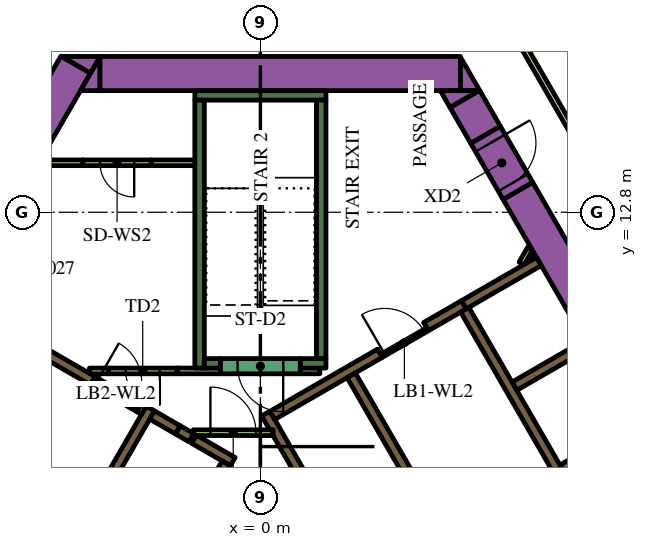
"""IFC4 building model, lengths in metres.
Left out: names, types, materials, properties, quantities, classifications, styles, units other than length and angle.
Written with IfcOpenShell. Run it as: python <this file> out.ifc"""

import sys

from ifc_helpers import new_model, si_unit, direction, frame, frame_2d, origin, place, context, subcontext, project, spatial, polyline, rectangle, outline, extrude, element, fill, save


model = new_model("IFC4")
c1 = context("Model", 3, precision=1e-05, world=origin(), true_north=direction((0.0, 1.0)))
c2 = subcontext(c1, "Body", "Model", "MODEL_VIEW")
j1 = project(units=[si_unit("LENGTHUNIT", "METRE"), si_unit("PLANEANGLEUNIT", "RADIAN")], contexts=[c1])
p1 = place(None, origin())
s1 = spatial("IfcSite", under=j1, at=p1, CompositionType="ELEMENT")
p2 = place(p1, origin())
s2 = spatial("IfcBuilding", under=s1, at=p2, CompositionType="ELEMENT")
p3 = place(p2, frame((0.0, 0.0, 126.6)))
s3 = spatial("IfcBuildingStorey", under=s2, at=p3, CompositionType="ELEMENT", Elevation=126.6)
p4 = place(p3, frame((6.776, 13.364, 0.0), z_axis=(0.0, 0.0, 1.0), x_axis=(0.500004177138, -0.8660229921, 0.0)))
e1 = element("IfcWall", 1, at=p4, inside=s3, PredefinedType="SOLIDWALL", context=c2, shape_type="SweptSolid", body=[
    extrude(rectangle(XDim=20.204, YDim=0.9, at=frame_2d((10.102, 0.0))), origin(), (0.0, 0.0, 1.0), 3.9),
])
p5 = place(p3, frame((-14.268, 0.387, 0.0), z_axis=(0.0, 0.0, 1.0), x_axis=(0.499994617707, 0.866028511231, 0.0)))
e2 = element("IfcWall", 2, at=p5, inside=s3, PredefinedType="SOLIDWALL", context=c2, shape_type="SweptSolid", body=[
    extrude(rectangle(XDim=18.817, YDim=0.9, at=frame_2d((9.409, 0.0))), origin(), (0.0, 0.0, 1.0), 3.9),
])
p6 = place(p3, origin())
e3 = element("IfcWall", 3, at=p6, inside=s3, PredefinedType="SOLIDWALL", context=c2, shape_type="SweptSolid", body=[
    extrude(outline(polyline([(-4.215, 16.9), (-4.469, 16.46), (-5.231, 16.9), (-4.215, 16.9)])), origin(), (0.0, 0.0, 1.0), 3.9),
])
p7 = place(p3, frame((-4.224, 16.45, 0.0), z_axis=(0.0, 0.0, 1.0), x_axis=(1.0, 0.0, 0.0)))
e4 = element("IfcWall", 4, at=p7, inside=s3, PredefinedType="SOLIDWALL", context=c2, shape_type="SweptSolid", body=[
    extrude(rectangle(XDim=9.488, YDim=0.9, at=frame_2d((4.744, 0.0))), origin(), (0.0, 0.0, 1.0), 3.9),
])
e5 = element("IfcWall", 5, at=p6, inside=s3, PredefinedType="SOLIDWALL", context=c2, shape_type="SweptSolid", body=[
    extrude(outline(polyline([(5.265, 16.0), (5.265, 16.88), (5.773, 16.0), (5.265, 16.0)])), origin(), (0.0, 0.0, 1.0), 3.9),
])
e6 = element("IfcWall", 6, at=p6, inside=s3, PredefinedType="SOLIDWALL", context=c2, shape_type="SweptSolid", body=[
    extrude(outline(polyline([(-4.734, 16.0), (-4.226, 16.88), (-4.226, 16.0), (-4.734, 16.0)])), origin(), (0.0, 0.0, 1.0), 3.9),
])
p8 = place(p3, frame((5.926, 14.836, 0.0), z_axis=(0.0, 0.0, 1.0), x_axis=(-0.500076735116, 0.865981096212, 0.0)))
e7 = element("IfcWall", 7, at=p8, inside=s3, PredefinedType="SOLIDWALL", context=c2, shape_type="SweptSolid", body=[
    extrude(rectangle(XDim=1.094, YDim=0.9, at=frame_2d((0.547, 0.0))), origin(), (0.0, 0.0, 1.0), 3.9),
])
e8 = element("IfcWall", 8, at=p6, inside=s3, PredefinedType="SOLIDWALL", context=c2, shape_type="SweptSolid", body=[
    extrude(outline(polyline([(4.734, 16.0), (5.75, 16.0), (4.988, 15.56), (4.734, 16.0)])), origin(), (0.0, 0.0, 1.0), 3.9),
])
p9 = place(p3, frame((-1.725, 15.875, 0.0), z_axis=(0.0, 0.0, 1.0), x_axis=(1.0, 0.0, 0.0)))
e9 = element("IfcWall", 9, at=p9, inside=s3, PredefinedType="SOLIDWALL", context=c2, shape_type="SweptSolid", body=[
    extrude(rectangle(XDim=3.45, YDim=0.25, at=frame_2d((1.725, 0.0))), origin(), (0.0, 0.0, 1.0), 3.9),
])
p10 = place(p3, frame((1.6, 8.95, 0.0), z_axis=(0.0, 0.0, 1.0), x_axis=(0.0, 1.0, 0.0)))
e10 = element("IfcWall", 10, at=p10, inside=s3, PredefinedType="SOLIDWALL", context=c2, shape_type="SweptSolid", body=[
    extrude(rectangle(XDim=6.8, YDim=0.25, at=frame_2d((3.4, 0.0))), origin(), (0.0, 0.0, 1.0), 3.9),
])
p11 = place(p3, frame((1.05, 8.825, 0.0), z_axis=(0.0, 0.0, 1.0), x_axis=(1.0, 0.0, 0.0)))
e11 = element("IfcWall", 11, at=p11, inside=s3, PredefinedType="SOLIDWALL", context=c2, shape_type="SweptSolid", body=[
    extrude(rectangle(XDim=0.675, YDim=0.25, at=frame_2d((0.337, 0.0))), origin(), (0.0, 0.0, 1.0), 3.9),
])
p12 = place(p3, frame((-1.6, 8.7, 0.0), z_axis=(0.0, 0.0, 1.0), x_axis=(0.0, 1.0, 0.0)))
e12 = element("IfcWall", 12, at=p12, inside=s3, PredefinedType="SOLIDWALL", context=c2, shape_type="SweptSolid", body=[
    extrude(rectangle(XDim=7.05, YDim=0.25, at=frame_2d((3.525, 0.0))), origin(), (0.0, 0.0, 1.0), 3.9),
])
p13 = place(p3, frame((-1.475, 8.825, 0.0), z_axis=(0.0, 0.0, 1.0), x_axis=(1.0, 0.0, 0.0)))
e13 = element("IfcWall", 13, at=p13, inside=s3, PredefinedType="SOLIDWALL", context=c2, shape_type="SweptSolid", body=[
    extrude(rectangle(XDim=0.425, YDim=0.25, at=frame_2d((0.212, 0.0))), origin(), (0.0, 0.0, 1.0), 3.9),
])
e14 = element("IfcWall", 14, at=p6, inside=s3, PredefinedType="SOLIDWALL", context=c2, shape_type="SweptSolid", body=[
    extrude(outline(polyline([(0.335, 6.925), (0.335, 6.925), (0.335, 7.075), (0.335, 7.075), (0.335, 7.075), (0.245, 7.075), (0.079, 7.363), (0.035, 7.439), (0.252, 7.564), (0.377, 7.348), (6.552, -3.348), (6.677, -3.564), (6.46, -3.689), (4.897, -0.981), (0.332, 6.925), (0.335, 6.925), (0.335, 6.925)])), origin(), (0.0, 0.0, 1.0), 3.9),
])
p14 = place(p3, frame((4.358, 9.791, 0.0), z_axis=(0.0, 0.0, 1.0), x_axis=(0.866079547155, 0.499906209203, 0.0)))
e15 = element("IfcWall", 15, at=p14, inside=s3, PredefinedType="SOLIDWALL", context=c2, shape_type="SweptSolid", body=[
    extrude(rectangle(XDim=1.15, YDim=0.25, at=frame_2d((0.575, 0.0))), origin(), (0.0, 0.0, 1.0), 3.9),
])
p15 = place(p3, frame((5.356, 10.367, 0.0), z_axis=(0.0, 0.0, 1.0), x_axis=(0.865978535641, 0.50008116922, 0.0)))
e16 = element("IfcWall", 16, at=p15, inside=s3, PredefinedType="SOLIDWALL", context=c2, shape_type="SweptSolid", body=[
    extrude(rectangle(XDim=2.278, YDim=0.25, at=frame_2d((1.139, 0.0))), origin(), (0.0, 0.0, 1.0), 3.9),
])
p16 = place(p3, frame((0.314, 7.456, 0.0), z_axis=(0.0, 0.0, 1.0), x_axis=(0.866013897511, 0.50001992892, 0.0)))
e17 = element("IfcWall", 17, at=p16, inside=s3, PredefinedType="SOLIDWALL", context=c2, shape_type="SweptSolid", body=[
    extrude(rectangle(XDim=3.268, YDim=0.25, at=frame_2d((1.634, 0.0))), origin(), (0.0, 0.0, 1.0), 3.9),
])
for number, where, z_axis, x_axis in (
    (18, (6.684, 8.224, 0.0), (0.0, 0.0, 1.0), (0.866, 0.5, 0.0)),
    (19, (7.944, 6.041, 0.0), (0.0, 0.0, 1.0), (0.866, 0.5, 0.0)),
):
    element("IfcWall", number, at=place(p3, frame(where, z_axis=z_axis, x_axis=x_axis)), inside=s3, PredefinedType="SOLIDWALL", context=c2, shape_type="SweptSolid", body=[
        extrude(rectangle(XDim=2.2, YDim=0.25, at=frame_2d((1.1, 0.0))), origin(), (0.0, 0.0, 1.0), 3.9),
    ])
p17 = place(p3, frame((-8.06, -1.311, 0.0), z_axis=(0.0, 0.0, 1.0), x_axis=(0.50000273126, 0.866023826885, 0.0)))
e20 = element("IfcWall", 20, at=p17, inside=s3, PredefinedType="SOLIDWALL", context=c2, shape_type="SweptSolid", body=[
    extrude(rectangle(XDim=10.33, YDim=0.25, at=frame_2d((5.165, 0.0))), origin(), (0.0, 0.0, 1.0), 3.9),
])
p18 = place(p3, frame((-1.819, 6.87, 0.0), z_axis=(0.0, 0.0, 1.0), x_axis=(-0.866294599386, 0.499533449405, 0.0)))
e21 = element("IfcWall", 21, at=p18, inside=s3, PredefinedType="SOLIDWALL", context=c2, shape_type="SweptSolid", body=[
    extrude(rectangle(XDim=0.41, YDim=0.25, at=frame_2d((0.205, 0.0))), origin(), (0.0, 0.0, 1.0), 3.9),
])
p19 = place(p3, frame((-2.849, 7.465, 0.0), z_axis=(0.0, 0.0, 1.0), x_axis=(0.865955664968, -0.500120771724, 0.0)))
e22 = element("IfcWall", 22, at=p19, inside=s3, PredefinedType="SOLIDWALL", context=c2, shape_type="SweptSolid", body=[
    extrude(rectangle(XDim=0.778, YDim=0.25, at=frame_2d((0.389, 0.0))), origin(), (0.0, 0.0, 1.0), 3.9),
])
p20 = place(p3, frame((-0.728, 6.24, 0.0), z_axis=(0.0, 0.0, 1.0), x_axis=(-0.866002680491, 0.500039355833, 0.0)))
e23 = element("IfcWall", 23, at=p20, inside=s3, PredefinedType="SOLIDWALL", context=c2, shape_type="SweptSolid", body=[
    extrude(rectangle(XDim=1.178, YDim=0.25, at=frame_2d((0.589, 0.0))), origin(), (0.0, 0.0, 1.0), 3.9),
])
e24 = element("IfcWall", 24, at=p6, inside=s3, PredefinedType="SOLIDWALL", context=c2, shape_type="SweptSolid", body=[
    extrude(outline(polyline([(-3.128, 7.481), (-3.259, 7.557), (-3.134, 7.773), (-3.003, 7.698), (-3.128, 7.481)])), origin(), (0.0, 0.0, 1.0), 3.9),
])
p21 = place(p3, frame((-7.959, 10.415, 0.0), z_axis=(0.0, 0.0, 1.0), x_axis=(0.866020958405, -0.500007699544, 0.0)))
e25 = element("IfcWall", 25, at=p21, inside=s3, PredefinedType="SOLIDWALL", context=c2, shape_type="SweptSolid", body=[
    extrude(rectangle(XDim=4.1, YDim=0.25, at=frame_2d((2.05, 0.0))), origin(), (0.0, 0.0, 1.0), 3.9),
])
p22 = place(p3, frame((-3.997, 8.625, 0.0), z_axis=(0.0, 0.0, 1.0), x_axis=(-1.0, 0.0, 0.0)))
e26 = element("IfcWall", 26, at=p22, inside=s3, PredefinedType="PARTITIONING", context=c2, shape_type="SweptSolid", body=[
    extrude(rectangle(XDim=0.502, YDim=0.15, at=frame_2d((0.251, 0.0))), origin(), (0.0, 0.0, 1.0), 2.75),
])
p23 = place(p3, frame((-5.851, 14.102, 0.0), z_axis=(0.0, 0.0, 1.0), x_axis=(1.0, 0.0, 0.0)))
e27 = element("IfcWall", 27, at=p23, inside=s3, PredefinedType="PARTITIONING", context=c2, shape_type="SweptSolid", body=[
    extrude(rectangle(XDim=1.18, YDim=0.15, at=frame_2d((0.59, 0.0))), origin(), (0.0, 0.0, 1.0), 2.75),
])
p24 = place(p3, frame((-2.196, 8.625, 0.0), z_axis=(0.0, 0.0, 1.0), x_axis=(1.0, 0.0, 0.0)))
e28 = element("IfcWall", 28, at=p24, inside=s3, PredefinedType="PARTITIONING", context=c2, shape_type="SweptSolid", body=[
    extrude(rectangle(XDim=1.146, YDim=0.15, at=frame_2d((0.573, 0.0))), origin(), (0.0, 0.0, 1.0), 2.75),
])
p25 = place(p3, frame((1.05, 8.625, 0.0), z_axis=(0.0, 0.0, 1.0), x_axis=(1.0, 0.0, 0.0)))
e29 = element("IfcWall", 29, at=p25, inside=s3, PredefinedType="PARTITIONING", context=c2, shape_type="SweptSolid", body=[
    extrude(rectangle(XDim=0.514, YDim=0.15, at=frame_2d((0.257, 0.0))), origin(), (0.0, 0.0, 1.0), 2.75),
])
p26 = place(p3, frame((6.872, 11.45, 0.0), z_axis=(0.0, 0.0, 1.0), x_axis=(0.499846793097, 0.866113839764, 0.0)))
e30 = element("IfcWall", 30, at=p26, inside=s3, PredefinedType="PARTITIONING", context=c2, shape_type="SweptSolid", body=[
    extrude(rectangle(XDim=0.453, YDim=0.15, at=frame_2d((0.227, 0.0))), origin(), (0.0, 0.0, 1.0), 2.75),
])
p27 = place(p3, frame((7.131, 11.6, 0.0), z_axis=(0.0, 0.0, 1.0), x_axis=(0.498600033135, 0.866832167699, 0.0)))
e31 = element("IfcWall", 31, at=p27, inside=s3, PredefinedType="PARTITIONING", context=c2, shape_type="SweptSolid", body=[
    extrude(rectangle(XDim=0.107, YDim=0.15, at=frame_2d((0.053, 0.0))), origin(), (0.0, 0.0, 1.0), 2.75),
])
p28 = place(p3, frame((-2.871, 14.102, 0.0), z_axis=(0.0, 0.0, 1.0), x_axis=(1.0, 0.0, 0.0)))
e32 = element("IfcWall", 32, at=p28, inside=s3, PredefinedType="PARTITIONING", context=c2, shape_type="SweptSolid", body=[
    extrude(rectangle(XDim=1.196, YDim=0.15, at=frame_2d((0.598, 0.0))), origin(), (0.0, 0.0, 1.0), 2.75),
])
p29 = place(p3, frame((11.553, -0.46, 0.0), z_axis=(0.0, 0.0, 1.0), x_axis=(-0.500006514828, 0.866021642414, 0.0)))
e33 = element("IfcWall", 33, at=p29, inside=s3, PredefinedType="SOLIDWALL", context=c2, shape_type="SweptSolid", body=[
    extrude(rectangle(XDim=12.35, YDim=0.25, at=frame_2d((6.175, 0.0))), origin(), (0.0, 0.0, 1.0), 3.9),
])
p30 = place(p29, frame((0.585, 0.0, 0.0)))
e34 = element("IfcOpeningElement", 34, at=p30, cuts=e33, PredefinedType="OPENING", context=c2, shape_type="SweptSolid", body=[
    extrude(rectangle(XDim=1.1, YDim=2.1, at=frame_2d((0.55, 1.05))), frame((0.0, 0.135, 0.0), z_axis=(0.0, -1.0, 0.0), x_axis=(1.0, 0.0, 0.0)), (0.0, 0.0, 1.0), 0.27),
])
p31 = place(p29, frame((3.105, 0.0, 0.0)))
e35 = element("IfcOpeningElement", 35, at=p31, cuts=e33, PredefinedType="OPENING", context=c2, shape_type="SweptSolid", body=[
    extrude(rectangle(XDim=1.1, YDim=2.1, at=frame_2d((0.55, 1.05))), frame((0.0, 0.135, 0.0), z_axis=(0.0, -1.0, 0.0), x_axis=(1.0, 0.0, 0.0)), (0.0, 0.0, 1.0), 0.27),
])
p32 = place(p29, frame((5.625, 0.0, 0.0)))
e36 = element("IfcOpeningElement", 36, at=p32, cuts=e33, PredefinedType="OPENING", context=c2, shape_type="SweptSolid", body=[
    extrude(rectangle(XDim=1.1, YDim=2.1, at=frame_2d((0.55, 1.05))), frame((0.0, 0.135, 0.0), z_axis=(0.0, -1.0, 0.0), x_axis=(1.0, 0.0, 0.0)), (0.0, 0.0, 1.0), 0.27),
])
p33 = place(p3, frame((8.565, -2.185, 0.0), z_axis=(0.0, 0.0, 1.0), x_axis=(-0.499997954832, 0.866026584559, 0.0)))
e37 = element("IfcWall", 37, at=p33, inside=s3, PredefinedType="SOLIDWALL", context=c2, shape_type="SweptSolid", body=[
    extrude(rectangle(XDim=12.35, YDim=0.25, at=frame_2d((6.175, 0.0))), origin(), (0.0, 0.0, 1.0), 3.9),
])
p34 = place(p33, frame((5.725, 0.0, 0.0)))
e38 = element("IfcOpeningElement", 38, at=p34, cuts=e37, PredefinedType="OPENING", context=c2, shape_type="SweptSolid", body=[
    extrude(rectangle(XDim=0.9, YDim=2.1, at=frame_2d((0.45, 1.05))), frame((0.0, 0.135, 0.0), z_axis=(0.0, -1.0, 0.0), x_axis=(1.0, 0.0, 0.0)), (0.0, 0.0, 1.0), 0.27),
])
p35 = place(p3, frame((-0.898, 6.194, 0.0), z_axis=(0.0, 0.0, 1.0), x_axis=(-0.499996202215, -0.866027596426, 0.0)))
e39 = element("IfcWall", 39, at=p35, inside=s3, PredefinedType="SOLIDWALL", context=c2, shape_type="SweptSolid", body=[
    extrude(rectangle(XDim=9.83, YDim=0.25, at=frame_2d((4.915, 0.0))), origin(), (0.0, 0.0, 1.0), 3.9),
])
p36 = place(p35, frame((0.585, 0.0, 0.0)))
e40 = element("IfcOpeningElement", 40, at=p36, cuts=e39, PredefinedType="OPENING", context=c2, shape_type="SweptSolid", body=[
    extrude(rectangle(XDim=1.1, YDim=2.1, at=frame_2d((0.55, 1.05))), frame((0.0, 0.135, 0.0), z_axis=(0.0, -1.0, 0.0), x_axis=(1.0, 0.0, 0.0)), (0.0, 0.0, 1.0), 0.27),
])
p37 = place(p35, frame((3.105, 0.0, 0.0)))
e41 = element("IfcOpeningElement", 41, at=p37, cuts=e39, PredefinedType="OPENING", context=c2, shape_type="SweptSolid", body=[
    extrude(rectangle(XDim=1.1, YDim=2.1, at=frame_2d((0.55, 1.05))), frame((0.0, 0.135, 0.0), z_axis=(0.0, -1.0, 0.0), x_axis=(1.0, 0.0, 0.0)), (0.0, 0.0, 1.0), 0.27),
])
p38 = place(p35, frame((5.625, 0.0, 0.0)))
e42 = element("IfcOpeningElement", 42, at=p38, cuts=e39, PredefinedType="OPENING", context=c2, shape_type="SweptSolid", body=[
    extrude(rectangle(XDim=1.1, YDim=2.1, at=frame_2d((0.55, 1.05))), frame((0.0, 0.135, 0.0), z_axis=(0.0, -1.0, 0.0), x_axis=(1.0, 0.0, 0.0)), (0.0, 0.0, 1.0), 0.27),
])
p39 = place(p35, frame((8.145, 0.0, 0.0)))
e43 = element("IfcOpeningElement", 43, at=p39, cuts=e39, PredefinedType="OPENING", context=c2, shape_type="SweptSolid", body=[
    extrude(rectangle(XDim=1.1, YDim=2.1, at=frame_2d((0.55, 1.05))), frame((0.0, 0.135, 0.0), z_axis=(0.0, -1.0, 0.0), x_axis=(1.0, 0.0, 0.0)), (0.0, 0.0, 1.0), 0.27),
])
p40 = place(p3, frame((1.05, 8.75, 0.0), z_axis=(0.0, 0.0, 1.0), x_axis=(-1.0, 0.0, 0.0)))
e44 = element("IfcWall", 44, at=p40, inside=s3, PredefinedType="SOLIDWALL", context=c2, shape_type="SweptSolid", body=[
    extrude(rectangle(XDim=2.1, YDim=0.4, at=frame_2d((1.05, 0.0))), origin(), (0.0, 0.0, 1.0), 3.9),
])
p41 = place(p40, frame((0.45, 0.0, 0.0)))
e45 = element("IfcOpeningElement", 45, at=p41, cuts=e44, PredefinedType="OPENING", context=c2, shape_type="SweptSolid", body=[
    extrude(rectangle(XDim=1.2, YDim=2.1, at=frame_2d((0.6, 1.05))), frame((0.0, 0.21, 0.0), z_axis=(0.0, -1.0, 0.0), x_axis=(1.0, 0.0, 0.0)), (0.0, 0.0, 1.0), 0.42),
])
p42 = place(p3, frame((-2.196, 8.625, 0.0), z_axis=(0.0, 0.0, 1.0), x_axis=(-1.0, 0.0, 0.0)))
e46 = element("IfcWall", 46, at=p42, inside=s3, PredefinedType="PARTITIONING", context=c2, shape_type="SweptSolid", body=[
    extrude(rectangle(XDim=1.8, YDim=0.15, at=frame_2d((0.9, 0.0))), origin(), (0.0, 0.0, 1.0), 2.75),
])
p43 = place(p42, frame((0.45, 0.0, 0.0)))
e47 = element("IfcOpeningElement", 47, at=p43, cuts=e46, PredefinedType="OPENING", context=c2, shape_type="SweptSolid", body=[
    extrude(rectangle(XDim=0.9, YDim=2.1, at=frame_2d((0.45, 1.05))), frame((0.0, 0.085, 0.0), z_axis=(0.0, -1.0, 0.0), x_axis=(1.0, 0.0, 0.0)), (0.0, 0.0, 1.0), 0.17),
])
p44 = place(p3, frame((-1.765, 7.0, 0.0), z_axis=(0.0, 0.0, 1.0), x_axis=(1.0, 0.0, 0.0)))
e48 = element("IfcWall", 48, at=p44, inside=s3, PredefinedType="PARTITIONING", context=c2, shape_type="SweptSolid", body=[
    extrude(rectangle(XDim=2.1, YDim=0.15, at=frame_2d((1.05, 0.0))), origin(), (0.0, 0.0, 1.0), 2.75),
])
p45 = place(p44, frame((0.45, 0.0, 0.0)))
e49 = element("IfcOpeningElement", 49, at=p45, cuts=e48, PredefinedType="OPENING", context=c2, shape_type="SweptSolid", body=[
    extrude(rectangle(XDim=1.2, YDim=2.1, at=frame_2d((0.6, 1.05))), frame((0.0, 0.085, 0.0), z_axis=(0.0, -1.0, 0.0), x_axis=(1.0, 0.0, 0.0)), (0.0, 0.0, 1.0), 0.17),
])
p46 = place(p3, frame((3.183, 9.02, 0.0), z_axis=(0.0, 0.0, 1.0), x_axis=(0.866034573852, 0.49998411664, 0.0)))
e50 = element("IfcWall", 50, at=p46, inside=s3, PredefinedType="PARTITIONING", context=c2, shape_type="SweptSolid", body=[
    extrude(rectangle(XDim=1.4, YDim=0.09, at=frame_2d((0.7, 0.0))), origin(), (0.0, 0.0, 1.0), 2.75),
])
p47 = place(p46, frame((0.1, 0.0, 0.0)))
e51 = element("IfcOpeningElement", 51, at=p47, cuts=e50, PredefinedType="OPENING", context=c2, shape_type="SweptSolid", body=[
    extrude(rectangle(XDim=1.2, YDim=2.1, at=frame_2d((0.6, 1.05))), frame((0.0, 0.055, 0.0), z_axis=(0.0, -1.0, 0.0), x_axis=(1.0, 0.0, 0.0)), (0.0, 0.0, 1.0), 0.11),
])
p48 = place(p3, frame((-4.409, 8.365, 0.0), z_axis=(0.0, 0.0, 1.0), x_axis=(0.866034573852, -0.49998411664, 0.0)))
e52 = element("IfcWall", 52, at=p48, inside=s3, PredefinedType="SOLIDWALL", context=c2, shape_type="SweptSolid", body=[
    extrude(rectangle(XDim=1.4, YDim=0.25, at=frame_2d((0.7, 0.0))), origin(), (0.0, 0.0, 1.0), 3.9),
])
p49 = place(p48, frame((0.1, 0.0, 0.0)))
e53 = element("IfcOpeningElement", 53, at=p49, cuts=e52, PredefinedType="OPENING", context=c2, shape_type="SweptSolid", body=[
    extrude(rectangle(XDim=1.2, YDim=2.1, at=frame_2d((0.6, 1.05))), frame((0.0, 0.135, 0.0), z_axis=(0.0, -1.0, 0.0), x_axis=(1.0, 0.0, 0.0)), (0.0, 0.0, 1.0), 0.27),
])
p50 = place(p3, frame((5.926, 14.836, 0.0), z_axis=(0.0, 0.0, 1.0), x_axis=(0.500062241894, -0.865989465428, 0.0)))
e54 = element("IfcWall", 54, at=p50, inside=s3, PredefinedType="SOLIDWALL", context=c2, shape_type="SweptSolid", body=[
    extrude(rectangle(XDim=1.7, YDim=0.9, at=frame_2d((0.85, 0.0))), origin(), (0.0, 0.0, 1.0), 3.9),
])
p51 = place(p50, frame((0.25, 0.0, 0.0)))
e55 = element("IfcOpeningElement", 55, at=p51, cuts=e54, PredefinedType="OPENING", context=c2, shape_type="SweptSolid", body=[
    extrude(rectangle(XDim=1.2, YDim=2.1, at=frame_2d((0.6, 1.05))), frame((0.0, 0.46, 0.0), z_axis=(0.0, -1.0, 0.0), x_axis=(1.0, 0.0, 0.0)), (0.0, 0.0, 1.0), 0.92),
])
p52 = place(p3, frame((-2.871, 14.102, 0.0), z_axis=(0.0, 0.0, 1.0), x_axis=(-1.0, 0.0, 0.0)))
e56 = element("IfcWall", 56, at=p52, inside=s3, PredefinedType="PARTITIONING", context=c2, shape_type="SweptSolid", body=[
    extrude(rectangle(XDim=1.8, YDim=0.15, at=frame_2d((0.9, 0.0))), origin(), (0.0, 0.0, 1.0), 2.75),
])
p53 = place(p52, frame((0.45, 0.0, 0.0)))
e57 = element("IfcOpeningElement", 57, at=p53, cuts=e56, PredefinedType="OPENING", context=c2, shape_type="SweptSolid", body=[
    extrude(rectangle(XDim=0.9, YDim=2.1, at=frame_2d((0.45, 1.05))), frame((0.0, 0.085, 0.0), z_axis=(0.0, -1.0, 0.0), x_axis=(1.0, 0.0, 0.0)), (0.0, 0.0, 1.0), 0.17),
])
p54 = place(p3, frame((6.163, 18.475, 0.0), z_axis=(0.0, 0.0, 1.0), x_axis=(0.500001317485, -0.866024643133, 0.0)))
e58 = element("IfcWall", 58, at=p54, inside=s3, PredefinedType="PARTITIONING", context=c2, shape_type="SweptSolid", body=[
    extrude(rectangle(XDim=25.767, YDim=0.15, at=frame_2d((12.883, 0.0))), origin(), (0.0, 0.0, 1.0), 2.75),
])
p55 = place(p54, frame((19.306, 0.0, 0.0)))
e59 = element("IfcOpeningElement", 59, at=p55, cuts=e58, PredefinedType="OPENING", context=c2, shape_type="SweptSolid", body=[
    extrude(rectangle(XDim=1.0, YDim=2.1, at=frame_2d((0.5, 1.05))), frame((0.0, 0.085, 0.0), z_axis=(0.0, -1.0, 0.0), x_axis=(1.0, 0.0, 0.0)), (0.0, 0.0, 1.0), 0.17),
])
p56 = place(p54, frame((17.999, 0.0, 0.0)))
e60 = element("IfcOpeningElement", 60, at=p56, cuts=e58, PredefinedType="OPENING", context=c2, shape_type="SweptSolid", body=[
    extrude(rectangle(XDim=1.0, YDim=2.1, at=frame_2d((0.5, 1.05))), frame((0.0, 0.085, 0.0), z_axis=(0.0, -1.0, 0.0), x_axis=(1.0, 0.0, 0.0)), (0.0, 0.0, 1.0), 0.17),
])
p57 = place(p54, frame((0.596, 0.0, 0.0)))
e61 = element("IfcOpeningElement", 61, at=p57, cuts=e58, PredefinedType="OPENING", context=c2, shape_type="SweptSolid", body=[
    extrude(rectangle(XDim=1.0, YDim=2.1, at=frame_2d((0.5, 1.05))), frame((0.0, 0.085, 0.0), z_axis=(0.0, -1.0, 0.0), x_axis=(1.0, 0.0, 0.0)), (0.0, 0.0, 1.0), 0.17),
])
p58 = place(p41, origin())
e62 = element("IfcDoor", 62, at=p58, inside=s3, OperationType="SINGLE_SWING_LEFT", PredefinedType="DOOR", context=c2, shape_type="SweptSolid", body=[
    extrude(rectangle(XDim=1.2, YDim=2.1, at=frame_2d((0.6, 1.05))), frame((0.0, 0.025, 0.0), z_axis=(0.0, -1.0, 0.0), x_axis=(1.0, 0.0, 0.0)), (0.0, 0.0, 1.0), 0.05),
])
fill(e45, e62)
p59 = place(p43, origin())
e63 = element("IfcDoor", 63, at=p59, inside=s3, OperationType="SINGLE_SWING_LEFT", PredefinedType="DOOR", context=c2, shape_type="SweptSolid", body=[
    extrude(rectangle(XDim=0.9, YDim=2.1, at=frame_2d((0.45, 1.05))), frame((0.0, 0.025, 0.0), z_axis=(0.0, -1.0, 0.0), x_axis=(1.0, 0.0, 0.0)), (0.0, 0.0, 1.0), 0.05),
])
fill(e47, e63)
p60 = place(p45, origin())
e64 = element("IfcDoor", 64, at=p60, inside=s3, OperationType="SINGLE_SWING_LEFT", PredefinedType="DOOR", context=c2, shape_type="SweptSolid", body=[
    extrude(rectangle(XDim=1.2, YDim=2.1, at=frame_2d((0.6, 1.05))), frame((0.0, 0.025, 0.0), z_axis=(0.0, -1.0, 0.0), x_axis=(1.0, 0.0, 0.0)), (0.0, 0.0, 1.0), 0.05),
])
fill(e49, e64)
p61 = place(p47, origin())
e65 = element("IfcDoor", 65, at=p61, inside=s3, OperationType="SINGLE_SWING_LEFT", PredefinedType="DOOR", context=c2, shape_type="SweptSolid", body=[
    extrude(rectangle(XDim=1.2, YDim=2.1, at=frame_2d((0.6, 1.05))), frame((0.0, 0.025, 0.0), z_axis=(0.0, -1.0, 0.0), x_axis=(1.0, 0.0, 0.0)), (0.0, 0.0, 1.0), 0.05),
])
fill(e51, e65)
p62 = place(p49, origin())
e66 = element("IfcDoor", 66, at=p62, inside=s3, OperationType="SINGLE_SWING_LEFT", PredefinedType="DOOR", context=c2, shape_type="SweptSolid", body=[
    extrude(rectangle(XDim=1.2, YDim=2.1, at=frame_2d((0.6, 1.05))), frame((0.0, 0.025, 0.0), z_axis=(0.0, -1.0, 0.0), x_axis=(1.0, 0.0, 0.0)), (0.0, 0.0, 1.0), 0.05),
])
fill(e53, e66)
p63 = place(p51, origin())
e67 = element("IfcDoor", 67, at=p63, inside=s3, OperationType="SINGLE_SWING_LEFT", PredefinedType="DOOR", context=c2, shape_type="SweptSolid", body=[
    extrude(rectangle(XDim=1.2, YDim=2.1, at=frame_2d((0.6, 1.05))), frame((0.0, 0.025, 0.0), z_axis=(0.0, -1.0, 0.0), x_axis=(1.0, 0.0, 0.0)), (0.0, 0.0, 1.0), 0.05),
])
fill(e55, e67)
p64 = place(p53, origin())
e68 = element("IfcDoor", 68, at=p64, inside=s3, OperationType="SINGLE_SWING_LEFT", PredefinedType="DOOR", context=c2, shape_type="SweptSolid", body=[
    extrude(rectangle(XDim=0.9, YDim=2.1, at=frame_2d((0.45, 1.05))), frame((0.0, 0.025, 0.0), z_axis=(0.0, -1.0, 0.0), x_axis=(1.0, 0.0, 0.0)), (0.0, 0.0, 1.0), 0.05),
])
fill(e57, e68)
save(model, sys.argv[1])
